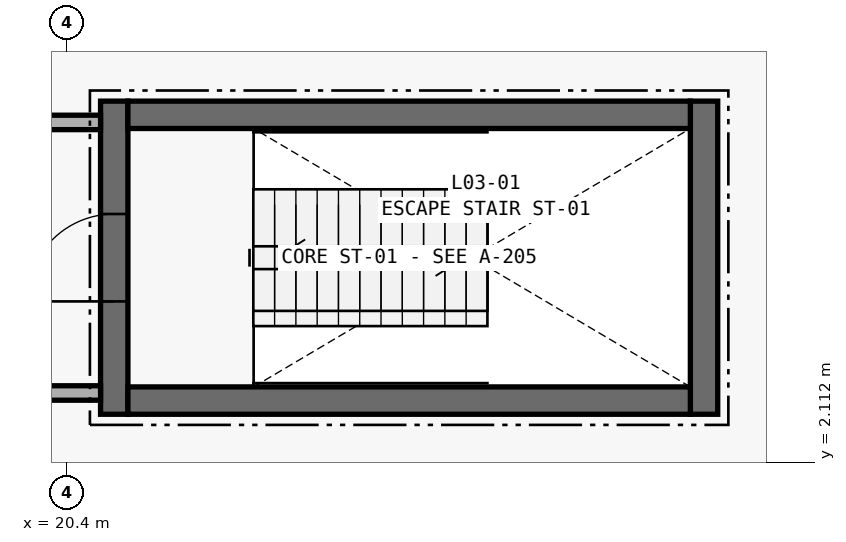
"""IFC4 building model, lengths in metres.
Left out: names, types, materials, properties, quantities, classifications, styles, units other than length and angle.
Written with IfcOpenShell. Run it as: python <this file> out.ifc"""

import sys

from ifc_helpers import new_model, si_unit, direction, frame, frame_2d, origin, place, context, subcontext, project, spatial, rectangle, extrude, element, fill, save


model = new_model("IFC4")
c1 = context("Model", 3, precision=1e-05, world=origin(), true_north=direction((0.0, 1.0)))
c2 = subcontext(c1, "Body", "Model", "MODEL_VIEW")
j1 = project(units=[si_unit("LENGTHUNIT", "METRE"), si_unit("PLANEANGLEUNIT", "RADIAN")], contexts=[c1])
p1 = place(None, origin())
s1 = spatial("IfcSite", under=j1, at=p1, CompositionType="ELEMENT")
p2 = place(p1, origin())
s2 = spatial("IfcBuilding", under=s1, at=p2, CompositionType="ELEMENT")
p3 = place(p2, frame((0.0, 0.0, 17.1)))
s3 = spatial("IfcBuildingStorey", under=s2, at=p3, CompositionType="ELEMENT", Elevation=17.1)
p4 = place(p3, frame((21.02, 2.74, 0.0), z_axis=(0.0, 0.0, 1.0), x_axis=(0.0, 1.0, 0.0)))
e1 = element("IfcWall", 1, at=p4, inside=s3, PredefinedType="SHEAR", context=c2, shape_type="SweptSolid", body=[
    extrude(rectangle(XDim=4.12, YDim=0.36, at=frame_2d((2.06, 0.0))), origin(), (0.0, 0.0, 1.0), 3.94),
])
p5 = place(p4, frame((1.485, 0.0, 0.0)))
e2 = element("IfcOpeningElement", 2, at=p5, cuts=e1, PredefinedType="OPENING", context=c2, shape_type="SweptSolid", body=[
    extrude(rectangle(XDim=1.15, YDim=2.15, at=frame_2d((0.575, 1.075))), frame((0.0, 0.195, 0.0), z_axis=(0.0, -1.0, 0.0), x_axis=(1.0, 0.0, 0.0)), (0.0, 0.0, 1.0), 0.39),
])
p6 = place(p3, frame((28.78, 2.74, 0.0), z_axis=(0.0, 0.0, 1.0), x_axis=(0.0, 1.0, 0.0)))
e3 = element("IfcWall", 3, at=p6, inside=s3, PredefinedType="SHEAR", context=c2, shape_type="SweptSolid", body=[
    extrude(rectangle(XDim=4.12, YDim=0.36, at=frame_2d((2.06, 0.0))), origin(), (0.0, 0.0, 1.0), 3.94),
])
for number, where, z_axis, x_axis in (
    (4, (21.2, 6.68, 0.0), (0.0, 0.0, 1.0), (1.0, 0.0, 0.0)),
    (5, (21.2, 2.92, 0.0), (0.0, 0.0, 1.0), (1.0, 0.0, 0.0)),
):
    element("IfcWall", number, at=place(p3, frame(where, z_axis=z_axis, x_axis=x_axis)), inside=s3, PredefinedType="SHEAR", context=c2, shape_type="SweptSolid", body=[
        extrude(rectangle(XDim=7.4, YDim=0.36, at=frame_2d((3.7, 0.0))), origin(), (0.0, 0.0, 1.0), 3.94),
    ])
p7 = place(p3, frame((16.825, 3.02, 0.0), z_axis=(0.0, 0.0, 1.0), x_axis=(1.0, 0.0, 0.0)))
e6 = element("IfcWall", 6, at=p7, inside=s3, PredefinedType="PARTITIONING", context=c2, shape_type="SweptSolid", body=[
    extrude(rectangle(XDim=4.015, YDim=0.19, at=frame_2d((2.008, 0.0))), origin(), (0.0, 0.0, 1.0), 2.82),
])
p8 = place(p3, frame((19.685, 6.58, 0.0), z_axis=(0.0, 0.0, 1.0), x_axis=(1.0, 0.0, 0.0)))
e7 = element("IfcWall", 7, at=p8, inside=s3, PredefinedType="PARTITIONING", context=c2, shape_type="SweptSolid", body=[
    extrude(rectangle(XDim=1.155, YDim=0.19, at=frame_2d((0.578, 0.0))), origin(), (0.0, 0.0, 1.0), 2.82),
])
p9 = place(p5, origin())
e8 = element("IfcDoor", 8, at=p9, inside=s3, OperationType="SINGLE_SWING_LEFT", PredefinedType="DOOR", context=c2, shape_type="SweptSolid", body=[
    extrude(rectangle(XDim=1.15, YDim=2.15, at=frame_2d((0.575, 1.075))), frame((0.0, 0.025, 0.0), z_axis=(0.0, -1.0, 0.0), x_axis=(1.0, 0.0, 0.0)), (0.0, 0.0, 1.0), 0.05),
])
fill(e2, e8)
save(model, sys.argv[1])
